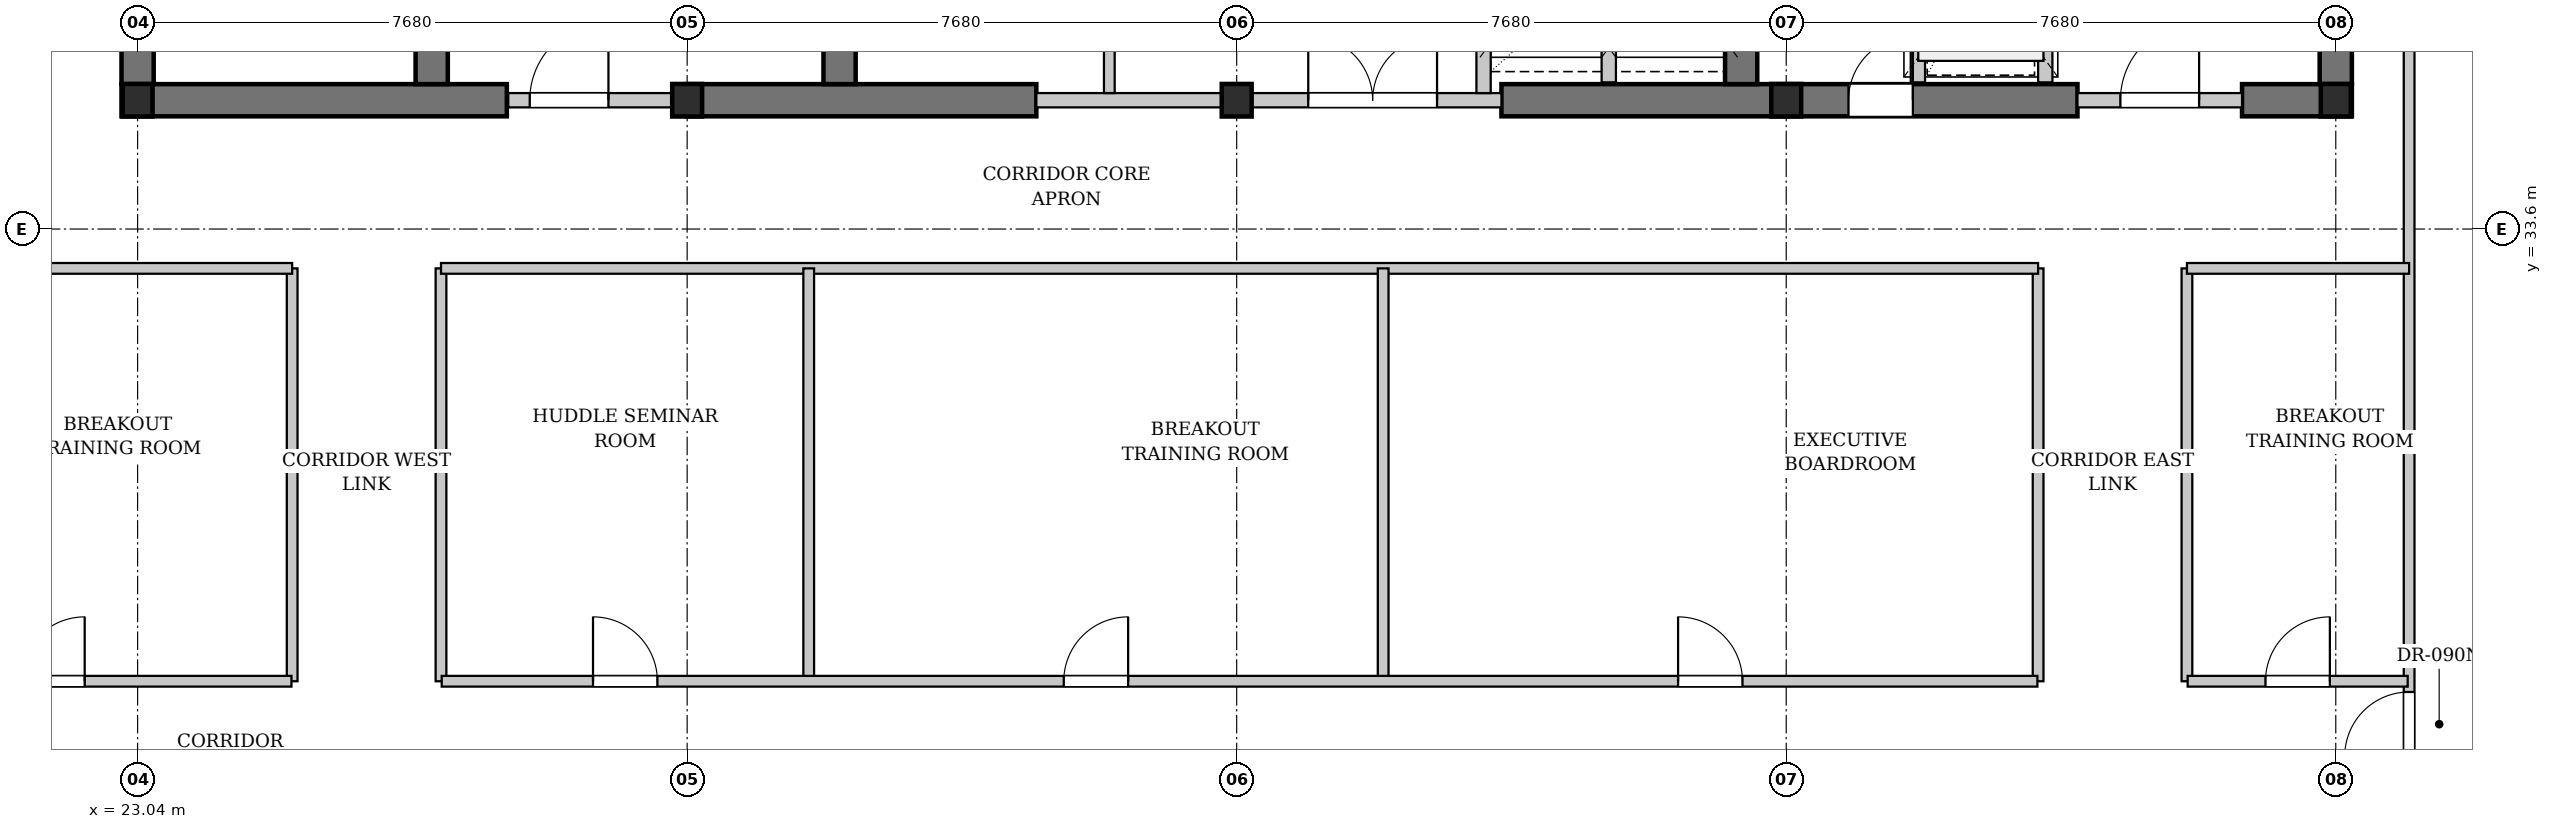
"""IFC4 building model, lengths in metres.
Left out: names, types, materials, properties, quantities, classifications, styles, units other than length and angle.
Written with IfcOpenShell. Run it as: python <this file> out.ifc"""

import sys

from ifc_helpers import new_model, si_unit, direction, frame, frame_2d, origin, origin_2d, place, context, subcontext, project, spatial, rectangle, i_section, extrude, element, fill, save


model = new_model("IFC4")
c1 = context("Model", 3, precision=1e-05, world=origin(), true_north=direction((0.0, 1.0)))
c2 = subcontext(c1, "Body", "Model", "MODEL_VIEW")
j1 = project(units=[si_unit("LENGTHUNIT", "METRE"), si_unit("PLANEANGLEUNIT", "RADIAN")], contexts=[c1])
p1 = place(None, origin())
s1 = spatial("IfcSite", under=j1, at=p1, CompositionType="ELEMENT")
p2 = place(p1, origin())
s2 = spatial("IfcBuilding", under=s1, at=p2, CompositionType="ELEMENT")
p3 = place(p2, frame((0.0, 0.0, 155.6)))
s3 = spatial("IfcBuildingStorey", under=s2, at=p3, CompositionType="ELEMENT", Elevation=155.6)
p4 = place(p3, frame((22.815, 35.4, 0.0), z_axis=(0.0, 0.0, 1.0), x_axis=(1.0, 0.0, 0.0)))
e1 = element("IfcWall", 1, at=p4, inside=s3, PredefinedType="SHEAR", context=c2, shape_type="SweptSolid", body=[
    extrude(rectangle(XDim=5.385, YDim=0.45, at=frame_2d((2.692, 0.0))), origin(), (0.0, 0.0, 1.0), 3.08),
])
p5 = place(p3, frame((30.72, 35.4, 0.0), z_axis=(0.0, 0.0, 1.0), x_axis=(1.0, 0.0, 0.0)))
e2 = element("IfcWall", 2, at=p5, inside=s3, PredefinedType="SHEAR", context=c2, shape_type="SweptSolid", body=[
    extrude(rectangle(XDim=4.88, YDim=0.45, at=frame_2d((2.44, 0.0))), origin(), (0.0, 0.0, 1.0), 3.08),
])
p6 = place(p3, frame((42.1, 35.4, 0.0), z_axis=(0.0, 0.0, 1.0), x_axis=(1.0, 0.0, 0.0)))
e3 = element("IfcWall", 3, at=p6, inside=s3, PredefinedType="SHEAR", context=c2, shape_type="SweptSolid", body=[
    extrude(rectangle(XDim=8.05, YDim=0.45, at=frame_2d((4.025, 0.0))), origin(), (0.0, 0.0, 1.0), 3.08),
])
p7 = place(p6, frame((4.85, 0.0, 0.0)))
e4 = element("IfcOpeningElement", 4, at=p7, cuts=e3, PredefinedType="OPENING", context=c2, shape_type="SweptSolid", body=[
    extrude(rectangle(XDim=0.9, YDim=2.15, at=frame_2d((0.45, 1.075))), frame((0.0, 0.235, 0.0), z_axis=(0.0, -1.0, 0.0), x_axis=(1.0, 0.0, 0.0)), (0.0, 0.0, 1.0), 0.47),
])
p8 = place(p3, frame((52.45, 35.4, 0.0), z_axis=(0.0, 0.0, 1.0), x_axis=(1.0, 0.0, 0.0)))
e5 = element("IfcWall", 5, at=p8, inside=s3, PredefinedType="SHEAR", context=c2, shape_type="SweptSolid", body=[
    extrude(rectangle(XDim=1.535, YDim=0.45, at=frame_2d((0.768, 0.0))), origin(), (0.0, 0.0, 1.0), 3.08),
])
p9 = place(p3, frame((23.04, 35.625, 0.0), z_axis=(0.0, 0.0, 1.0), x_axis=(0.0, 1.0, 0.0)))
e6 = element("IfcWall", 6, at=p9, inside=s3, PredefinedType="SHEAR", context=c2, shape_type="SweptSolid", body=[
    extrude(rectangle(XDim=10.35, YDim=0.45, at=frame_2d((5.175, 0.0))), origin(), (0.0, 0.0, 1.0), 3.08),
])
p10 = place(p3, frame((27.15, 35.625, 0.0), z_axis=(0.0, 0.0, 1.0), x_axis=(0.0, 1.0, 0.0)))
e7 = element("IfcWall", 7, at=p10, inside=s3, PredefinedType="SHEAR", context=c2, shape_type="SweptSolid", body=[
    extrude(rectangle(XDim=10.35, YDim=0.45, at=frame_2d((5.175, 0.0))), origin(), (0.0, 0.0, 1.0), 3.08),
])
p11 = place(p10, frame((0.675, 0.0, 0.0)))
e8 = element("IfcOpeningElement", 8, at=p11, cuts=e7, PredefinedType="OPENING", context=c2, shape_type="SweptSolid", body=[
    extrude(rectangle(XDim=1.1, YDim=2.15, at=frame_2d((0.55, 1.075))), frame((0.0, 0.235, 0.0), z_axis=(0.0, -1.0, 0.0), x_axis=(1.0, 0.0, 0.0)), (0.0, 0.0, 1.0), 0.47),
])
for number, where, z_axis, x_axis in (
    (9, (32.85, 35.625, 0.0), (0.0, 0.0, 1.0), (0.0, 1.0, 0.0)),
    (10, (45.45, 35.625, 0.0), (0.0, 0.0, 1.0), (0.0, 1.0, 0.0)),
    (11, (53.76, 35.625, 0.0), (0.0, 0.0, 1.0), (0.0, 1.0, 0.0)),
):
    element("IfcWall", number, at=place(p3, frame(where, z_axis=z_axis, x_axis=x_axis)), inside=s3, PredefinedType="SHEAR", context=c2, shape_type="SweptSolid", body=[
        extrude(rectangle(XDim=10.35, YDim=0.45, at=frame_2d((5.175, 0.0))), origin(), (0.0, 0.0, 1.0), 3.08),
    ])
for number, where, z_axis, x_axis in (
    (12, (23.04, 35.4, 0.0), (0.0, 0.0, 1.0), (1.0, 0.0, 0.0)),
    (13, (30.72, 35.4, 0.0), (0.0, 0.0, 1.0), (1.0, 0.0, 0.0)),
    (14, (38.4, 35.4, 0.0), (0.0, 0.0, 1.0), (1.0, 0.0, 0.0)),
    (15, (46.08, 35.4, 0.0), (0.0, 0.0, 1.0), (1.0, 0.0, 0.0)),
    (16, (53.76, 35.4, 0.0), (0.0, 0.0, 1.0), (1.0, 0.0, 0.0)),
):
    element("IfcColumn", number, at=place(p3, frame(where, z_axis=z_axis, x_axis=x_axis)), inside=s3, PredefinedType="COLUMN", context=c2, shape_type="SweptSolid", body=[
        extrude(i_section(OverallWidth=0.418, OverallDepth=0.455, WebThickness=0.042, FlangeThickness=0.068, FilletRadius=0.015, at=origin_2d()), origin(), (0.0, 0.0, 1.0), 3.3),
    ])
p12 = place(p3, frame((28.22, 35.4, 0.0), z_axis=(0.0, 0.0, 1.0), x_axis=(1.0, 0.0, 0.0)))
e17 = element("IfcWall", 17, at=p12, inside=s3, PredefinedType="PARTITIONING", context=c2, shape_type="SweptSolid", body=[
    extrude(rectangle(XDim=2.5, YDim=0.2, at=frame_2d((1.25, 0.0))), origin(), (0.0, 0.0, 1.0), 2.475),
])
p13 = place(p12, frame((0.3, 0.0, 0.0)))
e18 = element("IfcOpeningElement", 18, at=p13, cuts=e17, PredefinedType="OPENING", context=c2, shape_type="SweptSolid", body=[
    extrude(rectangle(XDim=1.1, YDim=2.15, at=frame_2d((0.55, 1.075))), frame((0.0, 0.11, 0.0), z_axis=(0.0, -1.0, 0.0), x_axis=(1.0, 0.0, 0.0)), (0.0, 0.0, 1.0), 0.22),
])
p14 = place(p3, frame((35.6, 35.4, 0.0), z_axis=(0.0, 0.0, 1.0), x_axis=(1.0, 0.0, 0.0)))
e19 = element("IfcWall", 19, at=p14, inside=s3, PredefinedType="PARTITIONING", context=c2, shape_type="SweptSolid", body=[
    extrude(rectangle(XDim=6.5, YDim=0.2, at=frame_2d((3.25, 0.0))), origin(), (0.0, 0.0, 1.0), 2.475),
])
p15 = place(p14, frame((3.8, 0.0, 0.0)))
e20 = element("IfcOpeningElement", 20, at=p15, cuts=e19, PredefinedType="OPENING", context=c2, shape_type="SweptSolid", body=[
    extrude(rectangle(XDim=1.8, YDim=2.3, at=frame_2d((0.9, 1.15))), frame((0.0, 0.11, 0.0), z_axis=(0.0, -1.0, 0.0), x_axis=(1.0, 0.0, 0.0)), (0.0, 0.0, 1.0), 0.22),
])
p16 = place(p3, frame((36.62, 35.5, 0.0), z_axis=(0.0, 0.0, 1.0), x_axis=(0.0, 1.0, 0.0)))
e21 = element("IfcWall", 21, at=p16, inside=s3, PredefinedType="PARTITIONING", context=c2, shape_type="SweptSolid", body=[
    extrude(rectangle(XDim=10.42, YDim=0.15, at=frame_2d((5.21, 0.0))), origin(), (0.0, 0.0, 1.0), 3.08),
])
p17 = place(p16, frame((3.92, 0.0, 0.0)))
e22 = element("IfcOpeningElement", 22, at=p17, cuts=e21, PredefinedType="OPENING", context=c2, shape_type="SweptSolid", body=[
    extrude(rectangle(XDim=0.9, YDim=2.15, at=frame_2d((0.45, 1.075))), frame((0.0, 0.085, 0.0), z_axis=(0.0, -1.0, 0.0), x_axis=(1.0, 0.0, 0.0)), (0.0, 0.0, 1.0), 0.17),
])
p18 = place(p16, frame((5.85, 0.0, 0.0)))
e23 = element("IfcOpeningElement", 23, at=p18, cuts=e21, PredefinedType="OPENING", context=c2, shape_type="SweptSolid", body=[
    extrude(rectangle(XDim=0.9, YDim=2.15, at=frame_2d((0.45, 1.075))), frame((0.0, 0.085, 0.0), z_axis=(0.0, -1.0, 0.0), x_axis=(1.0, 0.0, 0.0)), (0.0, 0.0, 1.0), 0.17),
])
p19 = place(p3, frame((43.6, 35.65, 0.0), z_axis=(0.0, 0.0, 1.0), x_axis=(0.0, 1.0, 0.0)))
e24 = element("IfcWall", 24, at=p19, inside=s3, PredefinedType="PARTITIONING", context=c2, shape_type="SweptSolid", body=[
    extrude(rectangle(XDim=3.25, YDim=0.2, at=frame_2d((1.625, 0.0))), origin(), (0.0, 0.0, 1.0), 3.08),
])
p20 = place(p3, frame((41.85, 35.5, 0.0), z_axis=(0.0, 0.0, 1.0), x_axis=(0.0, 1.0, 0.0)))
e25 = element("IfcWall", 25, at=p20, inside=s3, PredefinedType="PARTITIONING", context=c2, shape_type="SweptSolid", body=[
    extrude(rectangle(XDim=3.4, YDim=0.2, at=frame_2d((1.7, 0.0))), origin(), (0.0, 0.0, 1.0), 3.08),
])
p21 = place(p3, frame((50.15, 35.4, 0.0), z_axis=(0.0, 0.0, 1.0), x_axis=(1.0, 0.0, 0.0)))
e26 = element("IfcWall", 26, at=p21, inside=s3, PredefinedType="PARTITIONING", context=c2, shape_type="SweptSolid", body=[
    extrude(rectangle(XDim=2.3, YDim=0.2, at=frame_2d((1.15, 0.0))), origin(), (0.0, 0.0, 1.0), 2.475),
])
p22 = place(p21, frame((0.6, 0.0, 0.0)))
e27 = element("IfcOpeningElement", 27, at=p22, cuts=e26, PredefinedType="OPENING", context=c2, shape_type="SweptSolid", body=[
    extrude(rectangle(XDim=1.1, YDim=2.15, at=frame_2d((0.55, 1.075))), frame((0.0, 0.11, 0.0), z_axis=(0.0, -1.0, 0.0), x_axis=(1.0, 0.0, 0.0)), (0.0, 0.0, 1.0), 0.22),
])
p23 = place(p3, frame((49.7, 35.65, 0.0), z_axis=(0.0, 0.0, 1.0), x_axis=(0.0, 1.0, 0.0)))
e28 = element("IfcWall", 28, at=p23, inside=s3, PredefinedType="PARTITIONING", context=c2, shape_type="SweptSolid", body=[
    extrude(rectangle(XDim=3.15, YDim=0.2, at=frame_2d((1.575, 0.0))), origin(), (0.0, 0.0, 1.0), 3.08),
])
p24 = place(p23, frame((0.85, 0.0, 0.0)))
e29 = element("IfcOpeningElement", 29, at=p24, cuts=e28, PredefinedType="OPENING", context=c2, shape_type="SweptSolid", body=[
    extrude(rectangle(XDim=1.2, YDim=2.2, at=frame_2d((0.6, 1.1))), frame((0.0, 0.11, 0.0), z_axis=(0.0, -1.0, 0.0), x_axis=(1.0, 0.0, 0.0)), (0.0, 0.0, 1.0), 0.22),
])
p25 = place(p3, frame((47.92, 35.65, 0.0), z_axis=(0.0, 0.0, 1.0), x_axis=(0.0, 1.0, 0.0)))
e30 = element("IfcWall", 30, at=p25, inside=s3, PredefinedType="PARTITIONING", context=c2, shape_type="SweptSolid", body=[
    extrude(rectangle(XDim=3.15, YDim=0.2, at=frame_2d((1.575, 0.0))), origin(), (0.0, 0.0, 1.0), 3.08),
])
p26 = place(p3, frame((54.785, 25.2, 0.0), z_axis=(0.0, 0.0, 1.0), x_axis=(0.0, 1.0, 0.0)))
e31 = element("IfcWall", 31, at=p26, inside=s3, PredefinedType="PARTITIONING", context=c2, shape_type="SweptSolid", body=[
    extrude(rectangle(XDim=21.2, YDim=0.15, at=frame_2d((10.6, 0.0))), origin(), (0.0, 0.0, 1.0), 3.08),
])
p27 = place(p26, frame((1.03, 0.0, 0.0)))
e32 = element("IfcOpeningElement", 32, at=p27, cuts=e31, PredefinedType="OPENING", context=c2, shape_type="SweptSolid", body=[
    extrude(rectangle(XDim=0.9, YDim=2.15, at=frame_2d((0.45, 1.075))), frame((0.0, 0.085, 0.0), z_axis=(0.0, -1.0, 0.0), x_axis=(1.0, 0.0, 0.0)), (0.0, 0.0, 1.0), 0.17),
])
for number, where, z_axis, x_axis in (
    (33, (25.2, 27.28, 0.0), (0.0, 0.0, 1.0), (0.0, 1.0, 0.0)),
    (34, (27.28, 27.28, 0.0), (0.0, 0.0, 1.0), (0.0, 1.0, 0.0)),
    (35, (49.6, 27.28, 0.0), (0.0, 0.0, 1.0), (0.0, 1.0, 0.0)),
    (36, (51.68, 27.28, 0.0), (0.0, 0.0, 1.0), (0.0, 1.0, 0.0)),
):
    element("IfcWall", number, at=place(p3, frame(where, z_axis=z_axis, x_axis=x_axis)), inside=s3, PredefinedType="PARTITIONING", context=c2, shape_type="SweptSolid", body=[
        extrude(rectangle(XDim=5.77, YDim=0.15, at=frame_2d((2.885, 0.0))), origin(), (0.0, 0.0, 1.0), 3.08),
    ])
p28 = place(p3, frame((8.88, 33.05, 0.0), z_axis=(0.0, 0.0, 1.0), x_axis=(1.0, 0.0, 0.0)))
e37 = element("IfcWall", 37, at=p28, inside=s3, PredefinedType="PARTITIONING", context=c2, shape_type="SweptSolid", body=[
    extrude(rectangle(XDim=16.32, YDim=0.15, at=frame_2d((8.16, 0.0))), origin(), (0.0, 0.0, 1.0), 2.475),
])
p29 = place(p3, frame((27.28, 33.05, 0.0), z_axis=(0.0, 0.0, 1.0), x_axis=(1.0, 0.0, 0.0)))
e38 = element("IfcWall", 38, at=p29, inside=s3, PredefinedType="PARTITIONING", context=c2, shape_type="SweptSolid", body=[
    extrude(rectangle(XDim=22.32, YDim=0.15, at=frame_2d((11.16, 0.0))), origin(), (0.0, 0.0, 1.0), 3.08),
])
p30 = place(p3, frame((51.68, 33.05, 0.0), z_axis=(0.0, 0.0, 1.0), x_axis=(1.0, 0.0, 0.0)))
e39 = element("IfcWall", 39, at=p30, inside=s3, PredefinedType="PARTITIONING", context=c2, shape_type="SweptSolid", body=[
    extrude(rectangle(XDim=3.105, YDim=0.15, at=frame_2d((1.552, 0.0))), origin(), (0.0, 0.0, 1.0), 3.08),
])
p31 = place(p3, frame((8.9, 27.28, 0.0), z_axis=(0.0, 0.0, 1.0), x_axis=(1.0, 0.0, 0.0)))
e40 = element("IfcWall", 40, at=p31, inside=s3, PredefinedType="PARTITIONING", context=c2, shape_type="SweptSolid", body=[
    extrude(rectangle(XDim=16.29, YDim=0.15, at=frame_2d((8.145, 0.0))), origin(), (0.0, 0.0, 1.0), 2.475),
])
p32 = place(p31, frame((1.424, 0.0, 0.0)))
e41 = element("IfcOpeningElement", 41, at=p32, cuts=e40, PredefinedType="OPENING", context=c2, shape_type="SweptSolid", body=[
    extrude(rectangle(XDim=0.9, YDim=2.15, at=frame_2d((0.45, 1.075))), frame((0.0, 0.085, 0.0), z_axis=(0.0, -1.0, 0.0), x_axis=(1.0, 0.0, 0.0)), (0.0, 0.0, 1.0), 0.17),
])
p33 = place(p31, frame((6.229, 0.0, 0.0)))
e42 = element("IfcOpeningElement", 42, at=p33, cuts=e40, PredefinedType="OPENING", context=c2, shape_type="SweptSolid", body=[
    extrude(rectangle(XDim=0.9, YDim=2.15, at=frame_2d((0.45, 1.075))), frame((0.0, 0.085, 0.0), z_axis=(0.0, -1.0, 0.0), x_axis=(1.0, 0.0, 0.0)), (0.0, 0.0, 1.0), 0.17),
])
p34 = place(p31, frame((12.5, 0.0, 0.0)))
e43 = element("IfcOpeningElement", 43, at=p34, cuts=e40, PredefinedType="OPENING", context=c2, shape_type="SweptSolid", body=[
    extrude(rectangle(XDim=0.9, YDim=2.15, at=frame_2d((0.45, 1.075))), frame((0.0, 0.085, 0.0), z_axis=(0.0, -1.0, 0.0), x_axis=(1.0, 0.0, 0.0)), (0.0, 0.0, 1.0), 0.17),
])
for number, where, z_axis, x_axis in (
    (44, (32.419, 27.28, 0.0), (0.0, 0.0, 1.0), (0.0, 1.0, 0.0)),
    (45, (40.447, 27.28, 0.0), (0.0, 0.0, 1.0), (0.0, 1.0, 0.0)),
):
    element("IfcWall", number, at=place(p3, frame(where, z_axis=z_axis, x_axis=x_axis)), inside=s3, PredefinedType="PARTITIONING", context=c2, shape_type="SweptSolid", body=[
        extrude(rectangle(XDim=5.77, YDim=0.15, at=frame_2d((2.885, 0.0))), origin(), (0.0, 0.0, 1.0), 3.08),
    ])
p35 = place(p3, frame((27.29, 27.28, 0.0), z_axis=(0.0, 0.0, 1.0), x_axis=(1.0, 0.0, 0.0)))
e46 = element("IfcWall", 46, at=p35, inside=s3, PredefinedType="PARTITIONING", context=c2, shape_type="SweptSolid", body=[
    extrude(rectangle(XDim=22.3, YDim=0.15, at=frame_2d((11.15, 0.0))), origin(), (0.0, 0.0, 1.0), 3.08),
])
p36 = place(p35, frame((2.115, 0.0, 0.0)))
e47 = element("IfcOpeningElement", 47, at=p36, cuts=e46, PredefinedType="OPENING", context=c2, shape_type="SweptSolid", body=[
    extrude(rectangle(XDim=0.9, YDim=2.15, at=frame_2d((0.45, 1.075))), frame((0.0, 0.085, 0.0), z_axis=(0.0, -1.0, 0.0), x_axis=(1.0, 0.0, 0.0)), (0.0, 0.0, 1.0), 0.17),
])
p37 = place(p35, frame((8.693, 0.0, 0.0)))
e48 = element("IfcOpeningElement", 48, at=p37, cuts=e46, PredefinedType="OPENING", context=c2, shape_type="SweptSolid", body=[
    extrude(rectangle(XDim=0.9, YDim=2.15, at=frame_2d((0.45, 1.075))), frame((0.0, 0.085, 0.0), z_axis=(0.0, -1.0, 0.0), x_axis=(1.0, 0.0, 0.0)), (0.0, 0.0, 1.0), 0.17),
])
p38 = place(p35, frame((17.279, 0.0, 0.0)))
e49 = element("IfcOpeningElement", 49, at=p38, cuts=e46, PredefinedType="OPENING", context=c2, shape_type="SweptSolid", body=[
    extrude(rectangle(XDim=0.9, YDim=2.15, at=frame_2d((0.45, 1.075))), frame((0.0, 0.085, 0.0), z_axis=(0.0, -1.0, 0.0), x_axis=(1.0, 0.0, 0.0)), (0.0, 0.0, 1.0), 0.17),
])
p39 = place(p3, frame((51.69, 27.28, 0.0), z_axis=(0.0, 0.0, 1.0), x_axis=(1.0, 0.0, 0.0)))
e50 = element("IfcWall", 50, at=p39, inside=s3, PredefinedType="PARTITIONING", context=c2, shape_type="SweptSolid", body=[
    extrude(rectangle(XDim=3.075, YDim=0.15, at=frame_2d((1.538, 0.0))), origin(), (0.0, 0.0, 1.0), 3.08),
])
p40 = place(p39, frame((1.087, 0.0, 0.0)))
e51 = element("IfcOpeningElement", 51, at=p40, cuts=e50, PredefinedType="OPENING", context=c2, shape_type="SweptSolid", body=[
    extrude(rectangle(XDim=0.9, YDim=2.15, at=frame_2d((0.45, 1.075))), frame((0.0, 0.085, 0.0), z_axis=(0.0, -1.0, 0.0), x_axis=(1.0, 0.0, 0.0)), (0.0, 0.0, 1.0), 0.17),
])
p41 = place(p13, origin())
e52 = element("IfcDoor", 52, at=p41, inside=s3, OperationType="SINGLE_SWING_RIGHT", PredefinedType="DOOR", context=c2, shape_type="SweptSolid", body=[
    extrude(rectangle(XDim=1.1, YDim=2.15, at=frame_2d((0.55, 1.075))), frame((0.0, 0.025, 0.0), z_axis=(0.0, -1.0, 0.0), x_axis=(1.0, 0.0, 0.0)), (0.0, 0.0, 1.0), 0.05),
])
fill(e18, e52)
p42 = place(p15, origin())
e53 = element("IfcDoor", 53, at=p42, inside=s3, OperationType="DOUBLE_DOOR_SINGLE_SWING", PredefinedType="DOOR", context=c2, shape_type="SweptSolid", body=[
    extrude(rectangle(XDim=1.8, YDim=2.3, at=frame_2d((0.9, 1.15))), frame((0.0, 0.025, 0.0), z_axis=(0.0, -1.0, 0.0), x_axis=(1.0, 0.0, 0.0)), (0.0, 0.0, 1.0), 0.05),
])
fill(e20, e53)
p43 = place(p22, origin())
e54 = element("IfcDoor", 54, at=p43, inside=s3, OperationType="SINGLE_SWING_RIGHT", PredefinedType="DOOR", context=c2, shape_type="SweptSolid", body=[
    extrude(rectangle(XDim=1.1, YDim=2.15, at=frame_2d((0.55, 1.075))), frame((0.0, 0.025, 0.0), z_axis=(0.0, -1.0, 0.0), x_axis=(1.0, 0.0, 0.0)), (0.0, 0.0, 1.0), 0.05),
])
fill(e27, e54)
p44 = place(p27, origin())
e55 = element("IfcDoor", 55, at=p44, inside=s3, OperationType="SINGLE_SWING_LEFT", PredefinedType="DOOR", context=c2, shape_type="SweptSolid", body=[
    extrude(rectangle(XDim=0.9, YDim=2.15, at=frame_2d((0.45, 1.075))), frame((0.0, 0.025, 0.0), z_axis=(0.0, -1.0, 0.0), x_axis=(1.0, 0.0, 0.0)), (0.0, 0.0, 1.0), 0.05),
])
fill(e32, e55)
p45 = place(p34, origin())
e56 = element("IfcDoor", 56, at=p45, inside=s3, OperationType="SINGLE_SWING_RIGHT", PredefinedType="DOOR", context=c2, shape_type="SweptSolid", body=[
    extrude(rectangle(XDim=0.9, YDim=2.15, at=frame_2d((0.45, 1.075))), frame((0.0, 0.025, 0.0), z_axis=(0.0, -1.0, 0.0), x_axis=(1.0, 0.0, 0.0)), (0.0, 0.0, 1.0), 0.05),
])
fill(e43, e56)
p46 = place(p36, origin())
e57 = element("IfcDoor", 57, at=p46, inside=s3, OperationType="SINGLE_SWING_LEFT", PredefinedType="DOOR", context=c2, shape_type="SweptSolid", body=[
    extrude(rectangle(XDim=0.9, YDim=2.15, at=frame_2d((0.45, 1.075))), frame((0.0, 0.025, 0.0), z_axis=(0.0, -1.0, 0.0), x_axis=(1.0, 0.0, 0.0)), (0.0, 0.0, 1.0), 0.05),
])
fill(e47, e57)
p47 = place(p37, origin())
e58 = element("IfcDoor", 58, at=p47, inside=s3, OperationType="SINGLE_SWING_RIGHT", PredefinedType="DOOR", context=c2, shape_type="SweptSolid", body=[
    extrude(rectangle(XDim=0.9, YDim=2.15, at=frame_2d((0.45, 1.075))), frame((0.0, 0.025, 0.0), z_axis=(0.0, -1.0, 0.0), x_axis=(1.0, 0.0, 0.0)), (0.0, 0.0, 1.0), 0.05),
])
fill(e48, e58)
p48 = place(p38, origin())
e59 = element("IfcDoor", 59, at=p48, inside=s3, OperationType="SINGLE_SWING_LEFT", PredefinedType="DOOR", context=c2, shape_type="SweptSolid", body=[
    extrude(rectangle(XDim=0.9, YDim=2.15, at=frame_2d((0.45, 1.075))), frame((0.0, 0.025, 0.0), z_axis=(0.0, -1.0, 0.0), x_axis=(1.0, 0.0, 0.0)), (0.0, 0.0, 1.0), 0.05),
])
fill(e49, e59)
p49 = place(p40, origin())
e60 = element("IfcDoor", 60, at=p49, inside=s3, OperationType="SINGLE_SWING_RIGHT", PredefinedType="DOOR", context=c2, shape_type="SweptSolid", body=[
    extrude(rectangle(XDim=0.9, YDim=2.15, at=frame_2d((0.45, 1.075))), frame((0.0, 0.025, 0.0), z_axis=(0.0, -1.0, 0.0), x_axis=(1.0, 0.0, 0.0)), (0.0, 0.0, 1.0), 0.05),
])
fill(e51, e60)
p50 = place(p7, origin())
e61 = element("IfcDoor", 61, at=p50, inside=s3, OperationType="SINGLE_SWING_RIGHT", PredefinedType="DOOR", context=c2, shape_type="SweptSolid", body=[
    extrude(rectangle(XDim=0.9, YDim=2.15, at=frame_2d((0.45, 1.075))), frame((0.0, 0.025, 0.0), z_axis=(0.0, -1.0, 0.0), x_axis=(1.0, 0.0, 0.0)), (0.0, 0.0, 1.0), 0.05),
])
fill(e4, e61)
save(model, sys.argv[1])
